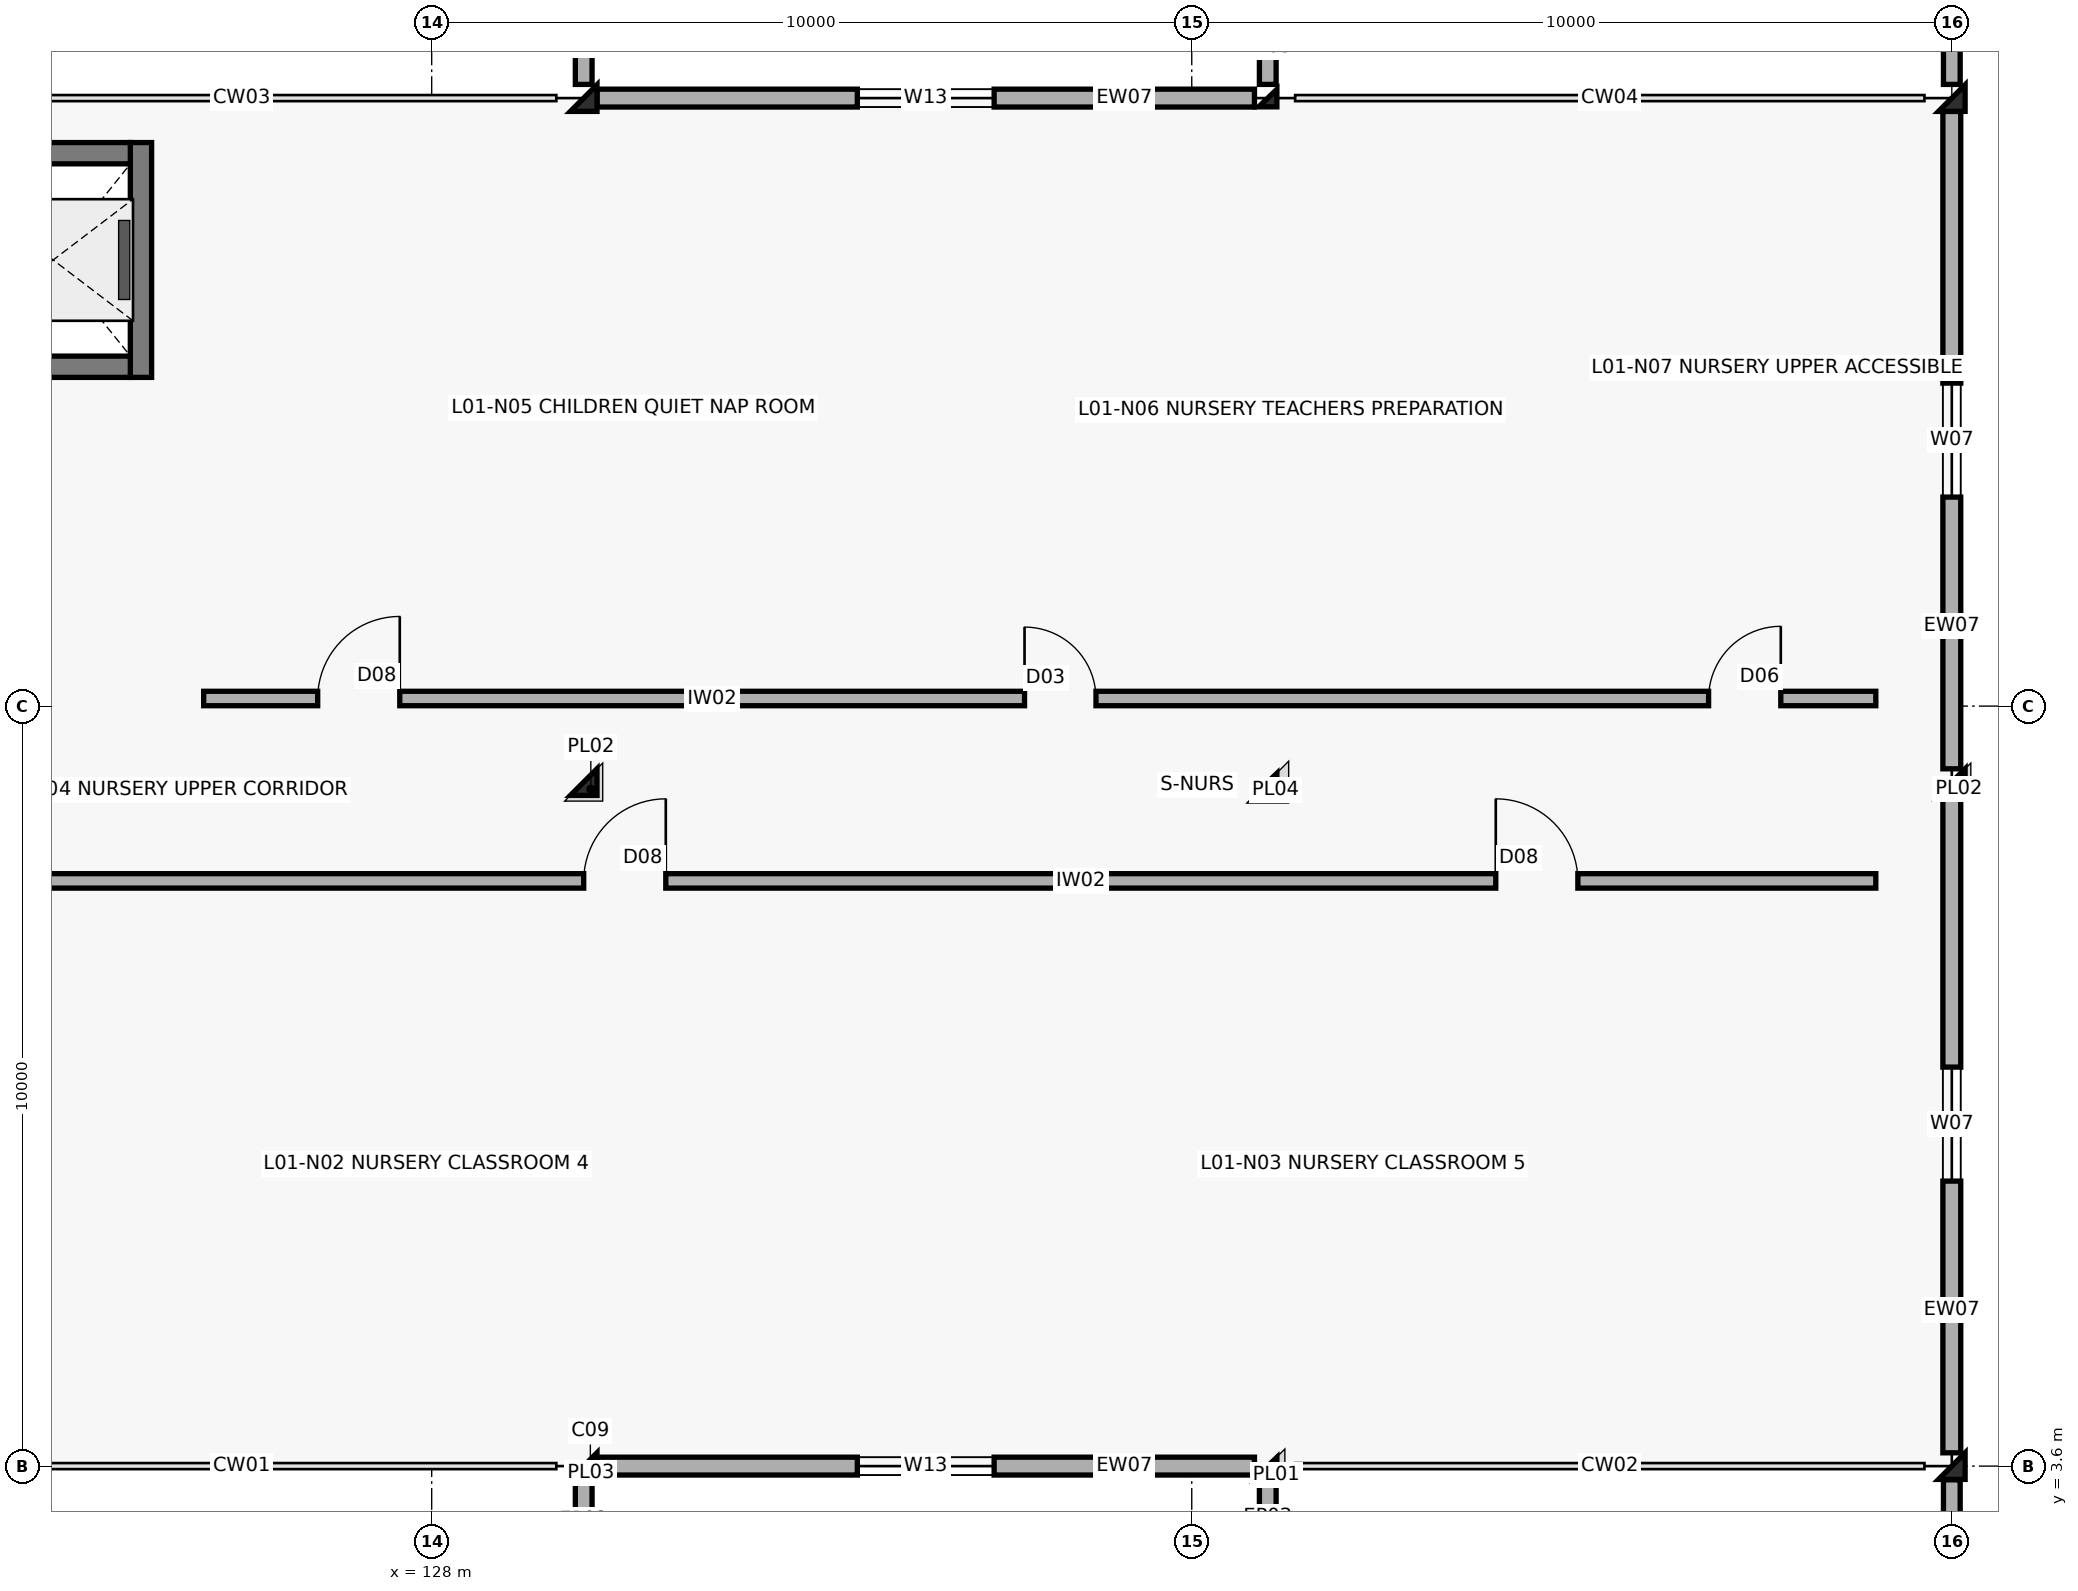
"""IFC4 building model, lengths in metres.
Left out: names, types, materials, properties, quantities, classifications, styles, units other than length and angle.
Written with IfcOpenShell. Run it as: python <this file> out.ifc"""

import sys

from ifc_helpers import new_model, si_unit, direction, frame, frame_2d, origin, origin_2d, place, context, subcontext, project, spatial, rectangle, i_section, extrude, element, fill, save


model = new_model("IFC4")
c1 = context("Model", 3, precision=1e-05, world=origin(), true_north=direction((0.0, 1.0)))
c2 = subcontext(c1, "Body", "Model", "MODEL_VIEW")
j1 = project(units=[si_unit("LENGTHUNIT", "METRE"), si_unit("PLANEANGLEUNIT", "RADIAN")], contexts=[c1])
p1 = place(None, origin())
s1 = spatial("IfcSite", under=j1, at=p1, CompositionType="ELEMENT")
p2 = place(p1, origin())
s2 = spatial("IfcBuilding", under=s1, at=p2, CompositionType="ELEMENT")
p3 = place(p2, frame((0.0, 0.0, 4.5)))
s3 = spatial("IfcBuildingStorey", under=s2, at=p3, CompositionType="ELEMENT", Elevation=4.5)
for number, where, z_axis, x_axis in (
    (1, (130.0, 3.6, 0.0), (0.0, 0.0, 1.0), (1.0, 0.0, 0.0)),
    (2, (130.0, 12.6, 0.0), (0.0, 0.0, 1.0), (1.0, 0.0, 0.0)),
    (3, (130.0, 21.6, 0.0), (0.0, 0.0, 1.0), (1.0, 0.0, 0.0)),
):
    element("IfcColumn", number, at=place(p3, frame(where, z_axis=z_axis, x_axis=x_axis)), inside=s3, PredefinedType="COLUMN", context=c2, shape_type="SweptSolid", body=[
        extrude(rectangle(XDim=0.35, YDim=0.35, at=origin_2d()), origin(), (0.0, 0.0, 1.0), 3.2),
    ])
for number, where, z_axis, x_axis in (
    (4, (139.0, 3.6, 0.0), (0.0, 0.0, 1.0), (1.0, 0.0, 0.0)),
    (5, (139.0, 12.6, 0.0), (0.0, 0.0, 1.0), (1.0, 0.0, 0.0)),
    (6, (139.0, 21.6, 0.0), (0.0, 0.0, 1.0), (1.0, 0.0, 0.0)),
):
    element("IfcColumn", number, at=place(p3, frame(where, z_axis=z_axis, x_axis=x_axis)), inside=s3, PredefinedType="COLUMN", context=c2, shape_type="SweptSolid", body=[
        extrude(i_section(OverallWidth=0.24, OverallDepth=0.23, WebThickness=0.008, FlangeThickness=0.012, FilletRadius=0.021, at=origin_2d()), origin(), (0.0, 0.0, 1.0), 3.2),
    ])
for number, where, z_axis, x_axis in (
    (7, (148.0, 3.6, 0.0), (0.0, 0.0, 1.0), (1.0, 0.0, 0.0)),
    (8, (148.0, 12.6, 0.0), (0.0, 0.0, 1.0), (1.0, 0.0, 0.0)),
    (9, (148.0, 21.6, 0.0), (0.0, 0.0, 1.0), (1.0, 0.0, 0.0)),
):
    element("IfcColumn", number, at=place(p3, frame(where, z_axis=z_axis, x_axis=x_axis)), inside=s3, PredefinedType="COLUMN", context=c2, shape_type="SweptSolid", body=[
        extrude(rectangle(XDim=0.35, YDim=0.35, at=origin_2d()), origin(), (0.0, 0.0, 1.0), 3.2),
    ])
p4 = place(p3, frame((130.175, 3.6, 0.0), z_axis=(0.0, 0.0, 1.0), x_axis=(1.0, 0.0, 0.0)))
e10 = element("IfcWall", 10, at=p4, inside=s3, PredefinedType="SOLIDWALL", context=c2, shape_type="SweptSolid", body=[
    extrude(rectangle(XDim=8.65, YDim=0.235, at=frame_2d((4.325, 0.0))), origin(), (0.0, 0.0, 1.0), 2.55),
])
p5 = place(p4, frame((3.425, 0.0, 0.45)))
e11 = element("IfcOpeningElement", 11, at=p5, cuts=e10, PredefinedType="OPENING", context=c2, shape_type="SweptSolid", body=[
    extrude(rectangle(XDim=1.8, YDim=1.8, at=frame_2d((0.9, 0.9))), frame((0.0, 0.127, 0.0), z_axis=(0.0, -1.0, 0.0), x_axis=(1.0, 0.0, 0.0)), (0.0, 0.0, 1.0), 0.255),
])
p6 = place(p3, frame((130.175, 21.6, 0.0), z_axis=(0.0, 0.0, 1.0), x_axis=(1.0, 0.0, 0.0)))
e12 = element("IfcWall", 12, at=p6, inside=s3, PredefinedType="SOLIDWALL", context=c2, shape_type="SweptSolid", body=[
    extrude(rectangle(XDim=8.65, YDim=0.235, at=frame_2d((4.325, 0.0))), origin(), (0.0, 0.0, 1.0), 2.55),
])
p7 = place(p6, frame((3.425, 0.0, 0.45)))
e13 = element("IfcOpeningElement", 13, at=p7, cuts=e12, PredefinedType="OPENING", context=c2, shape_type="SweptSolid", body=[
    extrude(rectangle(XDim=1.8, YDim=1.8, at=frame_2d((0.9, 0.9))), frame((0.0, 0.127, 0.0), z_axis=(0.0, -1.0, 0.0), x_axis=(1.0, 0.0, 0.0)), (0.0, 0.0, 1.0), 0.255),
])
p8 = place(p3, frame((148.0, 3.775, 0.0), z_axis=(0.0, 0.0, 1.0), x_axis=(0.0, 1.0, 0.0)))
e14 = element("IfcWall", 14, at=p8, inside=s3, PredefinedType="SOLIDWALL", context=c2, shape_type="SweptSolid", body=[
    extrude(rectangle(XDim=8.65, YDim=0.235, at=frame_2d((4.325, 0.0))), origin(), (0.0, 0.0, 1.0), 2.55),
])
p9 = place(p8, frame((3.575, 0.0, 0.45)))
e15 = element("IfcOpeningElement", 15, at=p9, cuts=e14, PredefinedType="OPENING", context=c2, shape_type="SweptSolid", body=[
    extrude(rectangle(XDim=1.5, YDim=1.65, at=frame_2d((0.75, 0.825))), frame((0.0, 0.127, 0.0), z_axis=(0.0, -1.0, 0.0), x_axis=(1.0, 0.0, 0.0)), (0.0, 0.0, 1.0), 0.255),
])
p10 = place(p3, frame((148.0, 12.775, 0.0), z_axis=(0.0, 0.0, 1.0), x_axis=(0.0, 1.0, 0.0)))
e16 = element("IfcWall", 16, at=p10, inside=s3, PredefinedType="SOLIDWALL", context=c2, shape_type="SweptSolid", body=[
    extrude(rectangle(XDim=8.65, YDim=0.235, at=frame_2d((4.325, 0.0))), origin(), (0.0, 0.0, 1.0), 2.55),
])
p11 = place(p10, frame((3.575, 0.0, 0.45)))
e17 = element("IfcOpeningElement", 17, at=p11, cuts=e16, PredefinedType="OPENING", context=c2, shape_type="SweptSolid", body=[
    extrude(rectangle(XDim=1.5, YDim=1.65, at=frame_2d((0.75, 0.825))), frame((0.0, 0.127, 0.0), z_axis=(0.0, -1.0, 0.0), x_axis=(1.0, 0.0, 0.0)), (0.0, 0.0, 1.0), 0.255),
])
for number, where, z_axis, x_axis in (
    (18, (130.0, 2.55, 0.0), (0.0, 0.0, 1.0), (0.0, 1.0, 0.0)),
    (19, (130.0, 21.78, 0.0), (0.0, 0.0, 1.0), (0.0, 1.0, 0.0)),
    (20, (139.0, 2.55, 0.0), (0.0, 0.0, 1.0), (0.0, 1.0, 0.0)),
    (21, (139.0, 21.78, 0.0), (0.0, 0.0, 1.0), (0.0, 1.0, 0.0)),
    (22, (148.0, 2.55, 0.0), (0.0, 0.0, 1.0), (0.0, 1.0, 0.0)),
    (23, (148.0, 21.78, 0.0), (0.0, 0.0, 1.0), (0.0, 1.0, 0.0)),
):
    element("IfcWall", number, at=place(p3, frame(where, z_axis=z_axis, x_axis=x_axis)), inside=s3, PredefinedType="PARAPET", context=c2, shape_type="SweptSolid", body=[
        extrude(rectangle(XDim=0.87, YDim=0.22, at=frame_2d((0.435, 0.0))), origin(), (0.0, 0.0, 1.0), 3.0),
    ])
p12 = place(p3, frame((124.175, 17.925, 0.0), z_axis=(0.0, 0.0, 1.0), x_axis=(0.0, 1.0, 0.0)))
e24 = element("IfcWall", 24, at=p12, inside=s3, PredefinedType="SHEAR", context=c2, shape_type="SweptSolid", body=[
    extrude(rectangle(XDim=3.09, YDim=0.28, at=frame_2d((1.545, 0.0))), origin(), (0.0, 0.0, 1.0), 3.6),
])
for number, where, z_axis, x_axis in (
    (25, (122.005, 18.065, 0.0), (0.0, 0.0, 1.0), (1.0, 0.0, 0.0)),
    (26, (122.005, 20.875, 0.0), (0.0, 0.0, 1.0), (1.0, 0.0, 0.0)),
):
    element("IfcWall", number, at=place(p3, frame(where, z_axis=z_axis, x_axis=x_axis)), inside=s3, PredefinedType="SHEAR", context=c2, shape_type="SweptSolid", body=[
        extrude(rectangle(XDim=2.03, YDim=0.28, at=frame_2d((1.015, 0.0))), origin(), (0.0, 0.0, 1.0), 3.6),
    ])
p13 = place(p3, frame((113.0, 11.3, 0.0), z_axis=(0.0, 0.0, 1.0), x_axis=(1.0, 0.0, 0.0)))
e27 = element("IfcWall", 27, at=p13, inside=s3, PredefinedType="SOLIDWALL", context=c2, shape_type="SweptSolid", body=[
    extrude(rectangle(XDim=34.0, YDim=0.19, at=frame_2d((17.0, 0.0))), origin(), (0.0, 0.0, 1.0), 2.3),
])
p14 = place(p13, frame((5.0, 0.0, 0.0)))
e28 = element("IfcOpeningElement", 28, at=p14, cuts=e27, PredefinedType="OPENING", context=c2, shape_type="SweptSolid", body=[
    extrude(rectangle(XDim=1.08, YDim=2.15, at=frame_2d((0.54, 1.075))), frame((0.0, 0.105, 0.0), z_axis=(0.0, -1.0, 0.0), x_axis=(1.0, 0.0, 0.0)), (0.0, 0.0, 1.0), 0.21),
])
p15 = place(p13, frame((17.0, 0.0, 0.0)))
e29 = element("IfcOpeningElement", 29, at=p15, cuts=e27, PredefinedType="OPENING", context=c2, shape_type="SweptSolid", body=[
    extrude(rectangle(XDim=1.08, YDim=2.15, at=frame_2d((0.54, 1.075))), frame((0.0, 0.105, 0.0), z_axis=(0.0, -1.0, 0.0), x_axis=(1.0, 0.0, 0.0)), (0.0, 0.0, 1.0), 0.21),
])
p16 = place(p13, frame((29.0, 0.0, 0.0)))
e30 = element("IfcOpeningElement", 30, at=p16, cuts=e27, PredefinedType="OPENING", context=c2, shape_type="SweptSolid", body=[
    extrude(rectangle(XDim=1.08, YDim=2.15, at=frame_2d((0.54, 1.075))), frame((0.0, 0.105, 0.0), z_axis=(0.0, -1.0, 0.0), x_axis=(1.0, 0.0, 0.0)), (0.0, 0.0, 1.0), 0.21),
])
p17 = place(p3, frame((125.0, 13.7, 0.0), z_axis=(0.0, 0.0, 1.0), x_axis=(1.0, 0.0, 0.0)))
e31 = element("IfcWall", 31, at=p17, inside=s3, PredefinedType="SOLIDWALL", context=c2, shape_type="SweptSolid", body=[
    extrude(rectangle(XDim=22.0, YDim=0.19, at=frame_2d((11.0, 0.0))), origin(), (0.0, 0.0, 1.0), 2.3),
])
p18 = place(p17, frame((1.5, 0.0, 0.0)))
e32 = element("IfcOpeningElement", 32, at=p18, cuts=e31, PredefinedType="OPENING", context=c2, shape_type="SweptSolid", body=[
    extrude(rectangle(XDim=1.08, YDim=2.15, at=frame_2d((0.54, 1.075))), frame((0.0, 0.105, 0.0), z_axis=(0.0, -1.0, 0.0), x_axis=(1.0, 0.0, 0.0)), (0.0, 0.0, 1.0), 0.21),
])
p19 = place(p17, frame((10.8, 0.0, 0.0)))
e33 = element("IfcOpeningElement", 33, at=p19, cuts=e31, PredefinedType="OPENING", context=c2, shape_type="SweptSolid", body=[
    extrude(rectangle(XDim=0.94, YDim=2.1, at=frame_2d((0.47, 1.05))), frame((0.0, 0.105, 0.0), z_axis=(0.0, -1.0, 0.0), x_axis=(1.0, 0.0, 0.0)), (0.0, 0.0, 1.0), 0.21),
])
p20 = place(p17, frame((19.8, 0.0, 0.0)))
e34 = element("IfcOpeningElement", 34, at=p20, cuts=e31, PredefinedType="OPENING", context=c2, shape_type="SweptSolid", body=[
    extrude(rectangle(XDim=0.95, YDim=2.1, at=frame_2d((0.475, 1.05))), frame((0.0, 0.105, 0.0), z_axis=(0.0, -1.0, 0.0), x_axis=(1.0, 0.0, 0.0)), (0.0, 0.0, 1.0), 0.21),
])
p21 = place(p5, origin())
e35 = element("IfcWindow", 35, at=p21, inside=s3, PartitioningType="TRIPLE_PANEL_VERTICAL", PredefinedType="WINDOW", context=c2, shape_type="SweptSolid", body=[
    extrude(rectangle(XDim=1.8, YDim=1.8, at=frame_2d((0.9, 0.9))), frame((0.0, 0.03, 0.0), z_axis=(0.0, -1.0, 0.0), x_axis=(1.0, 0.0, 0.0)), (0.0, 0.0, 1.0), 0.06),
])
fill(e11, e35)
p22 = place(p7, origin())
e36 = element("IfcWindow", 36, at=p22, inside=s3, PartitioningType="TRIPLE_PANEL_VERTICAL", PredefinedType="WINDOW", context=c2, shape_type="SweptSolid", body=[
    extrude(rectangle(XDim=1.8, YDim=1.8, at=frame_2d((0.9, 0.9))), frame((0.0, 0.03, 0.0), z_axis=(0.0, -1.0, 0.0), x_axis=(1.0, 0.0, 0.0)), (0.0, 0.0, 1.0), 0.06),
])
fill(e13, e36)
p23 = place(p9, origin())
e37 = element("IfcWindow", 37, at=p23, inside=s3, PartitioningType="DOUBLE_PANEL_VERTICAL", PredefinedType="WINDOW", context=c2, shape_type="SweptSolid", body=[
    extrude(rectangle(XDim=1.5, YDim=1.65, at=frame_2d((0.75, 0.825))), frame((0.0, 0.03, 0.0), z_axis=(0.0, -1.0, 0.0), x_axis=(1.0, 0.0, 0.0)), (0.0, 0.0, 1.0), 0.06),
])
fill(e15, e37)
p24 = place(p11, origin())
e38 = element("IfcWindow", 38, at=p24, inside=s3, PartitioningType="DOUBLE_PANEL_VERTICAL", PredefinedType="WINDOW", context=c2, shape_type="SweptSolid", body=[
    extrude(rectangle(XDim=1.5, YDim=1.65, at=frame_2d((0.75, 0.825))), frame((0.0, 0.03, 0.0), z_axis=(0.0, -1.0, 0.0), x_axis=(1.0, 0.0, 0.0)), (0.0, 0.0, 1.0), 0.06),
])
fill(e17, e38)
p25 = place(p15, origin())
e39 = element("IfcDoor", 39, at=p25, inside=s3, OperationType="SINGLE_SWING_RIGHT", PredefinedType="DOOR", context=c2, shape_type="SweptSolid", body=[
    extrude(rectangle(XDim=1.08, YDim=2.15, at=frame_2d((0.54, 1.075))), frame((0.0, 0.025, 0.0), z_axis=(0.0, -1.0, 0.0), x_axis=(1.0, 0.0, 0.0)), (0.0, 0.0, 1.0), 0.05),
])
fill(e29, e39)
p26 = place(p16, origin())
e40 = element("IfcDoor", 40, at=p26, inside=s3, OperationType="SINGLE_SWING_LEFT", PredefinedType="DOOR", context=c2, shape_type="SweptSolid", body=[
    extrude(rectangle(XDim=1.08, YDim=2.15, at=frame_2d((0.54, 1.075))), frame((0.0, 0.025, 0.0), z_axis=(0.0, -1.0, 0.0), x_axis=(1.0, 0.0, 0.0)), (0.0, 0.0, 1.0), 0.05),
])
fill(e30, e40)
p27 = place(p18, origin())
e41 = element("IfcDoor", 41, at=p27, inside=s3, OperationType="SINGLE_SWING_RIGHT", PredefinedType="DOOR", context=c2, shape_type="SweptSolid", body=[
    extrude(rectangle(XDim=1.08, YDim=2.15, at=frame_2d((0.54, 1.075))), frame((0.0, 0.025, 0.0), z_axis=(0.0, -1.0, 0.0), x_axis=(1.0, 0.0, 0.0)), (0.0, 0.0, 1.0), 0.05),
])
fill(e32, e41)
p28 = place(p19, origin())
e42 = element("IfcDoor", 42, at=p28, inside=s3, OperationType="SINGLE_SWING_LEFT", PredefinedType="DOOR", context=c2, shape_type="SweptSolid", body=[
    extrude(rectangle(XDim=0.94, YDim=2.1, at=frame_2d((0.47, 1.05))), frame((0.0, 0.025, 0.0), z_axis=(0.0, -1.0, 0.0), x_axis=(1.0, 0.0, 0.0)), (0.0, 0.0, 1.0), 0.05),
])
fill(e33, e42)
p29 = place(p20, origin())
e43 = element("IfcDoor", 43, at=p29, inside=s3, OperationType="SINGLE_SWING_RIGHT", PredefinedType="DOOR", context=c2, shape_type="SweptSolid", body=[
    extrude(rectangle(XDim=0.95, YDim=2.1, at=frame_2d((0.475, 1.05))), frame((0.0, 0.025, 0.0), z_axis=(0.0, -1.0, 0.0), x_axis=(1.0, 0.0, 0.0)), (0.0, 0.0, 1.0), 0.05),
])
fill(e34, e43)
save(model, sys.argv[1])
